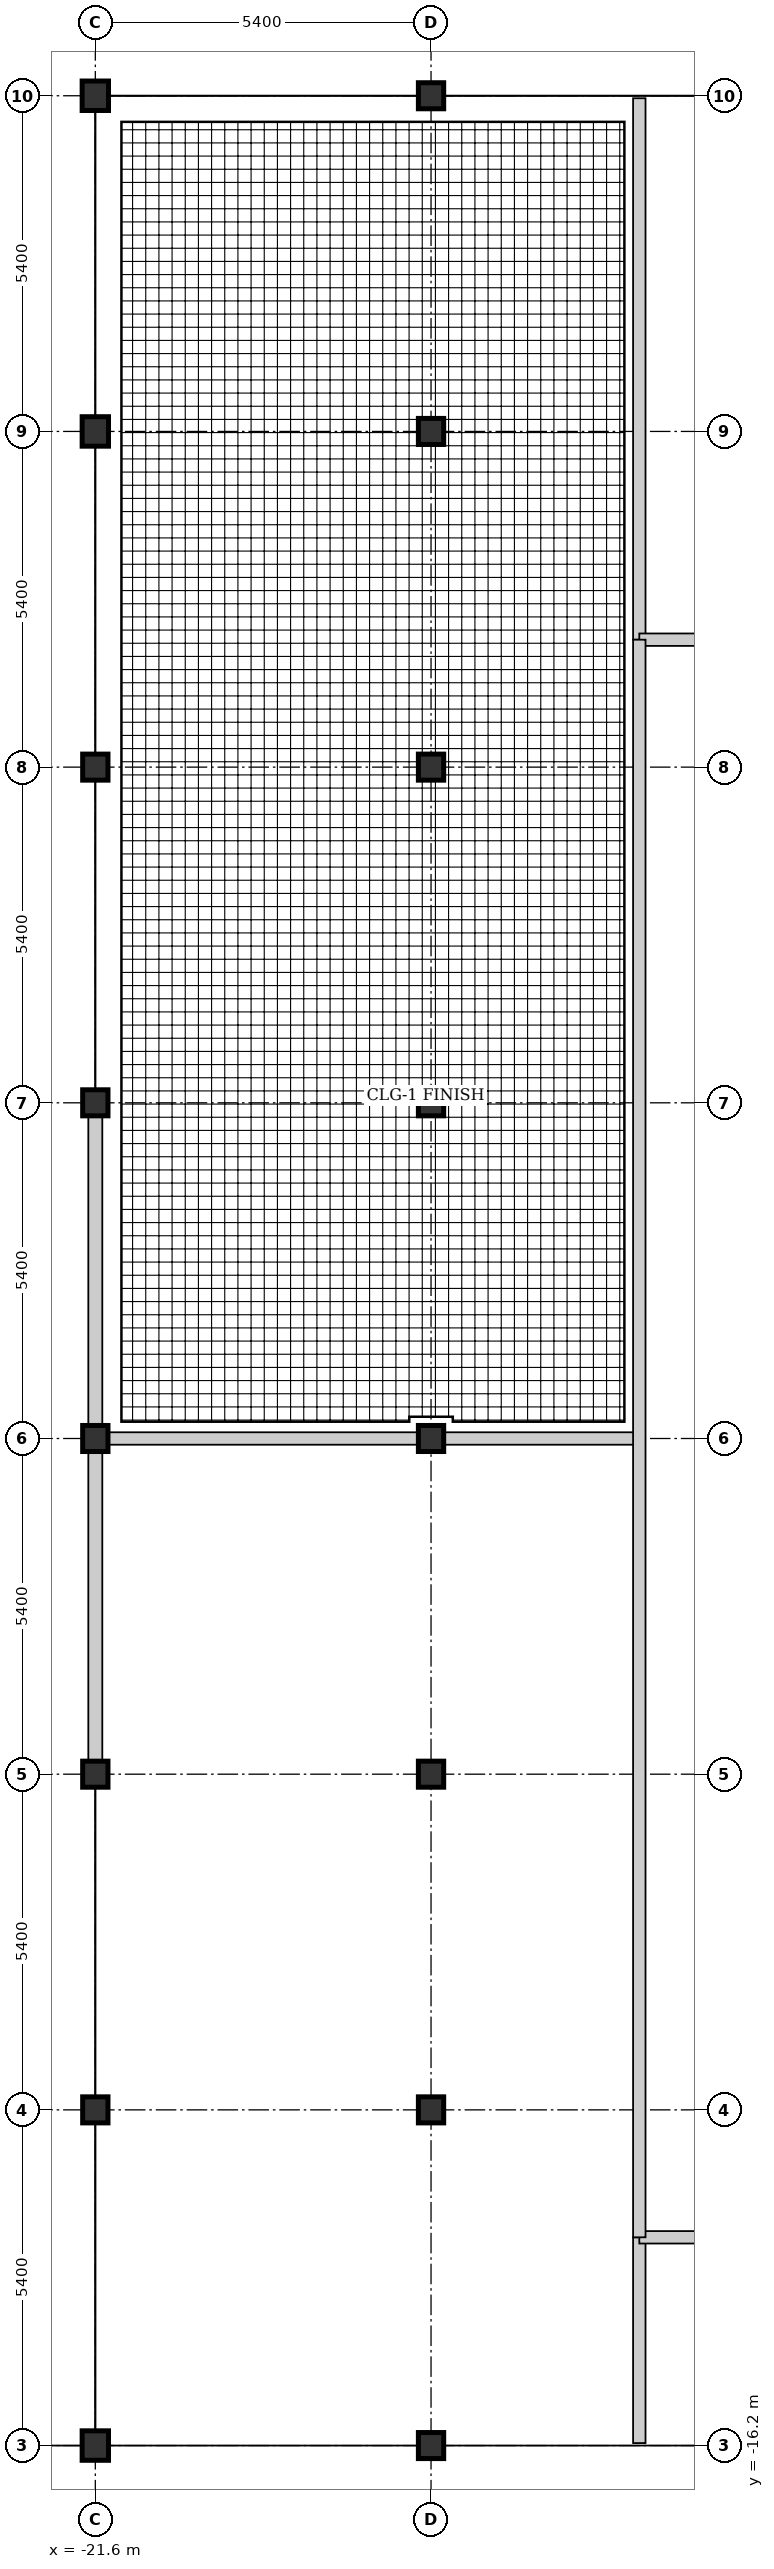
"""IFC4 building model, lengths in metres.
Left out: names, types, materials, properties, quantities, classifications, styles, units other than length and angle.
Written with IfcOpenShell. Run it as: python <this file> out.ifc"""

import sys

from ifc_helpers import new_model, si_unit, direction, frame, frame_2d, origin, origin_2d, place, context, subcontext, project, spatial, rectangle, i_section, extrude, element, fill, save


model = new_model("IFC4")
c1 = context("Model", 3, precision=1e-05, world=origin(), true_north=direction((0.0, 1.0)))
c2 = subcontext(c1, "Body", "Model", "MODEL_VIEW")
j1 = project(units=[si_unit("LENGTHUNIT", "METRE"), si_unit("PLANEANGLEUNIT", "RADIAN")], contexts=[c1])
p1 = place(None, origin())
s1 = spatial("IfcSite", under=j1, at=p1, CompositionType="ELEMENT")
p2 = place(p1, origin())
s2 = spatial("IfcBuilding", under=s1, at=p2, CompositionType="ELEMENT")
p3 = place(p2, frame((0.0, 0.0, 337.5)))
s3 = spatial("IfcBuildingStorey", under=s2, at=p3, CompositionType="ELEMENT", Elevation=337.5)
p4 = place(p3, frame((-21.6, -16.2, 0.0), z_axis=(0.0, 0.0, 1.0), x_axis=(1.0, 0.0, 0.0)))
e1 = element("IfcColumn", 1, at=p4, inside=s3, PredefinedType="COLUMN", context=c2, shape_type="SweptSolid", body=[
    extrude(i_section(OverallWidth=0.424, OverallDepth=0.474, WebThickness=0.043, FlangeThickness=0.065, at=origin_2d()), origin(), (0.0, 0.0, 1.0), 4.5),
])
for number, where, z_axis, x_axis in (
    (2, (-21.6, -10.8, 0.0), (0.0, 0.0, 1.0), (1.0, 0.0, 0.0)),
    (3, (-21.6, -5.4, 0.0), (0.0, 0.0, 1.0), (1.0, 0.0, 0.0)),
    (4, (-21.6, 0.0, 0.0), (0.0, 0.0, 1.0), (1.0, 0.0, 0.0)),
    (5, (-21.6, 5.4, 0.0), (0.0, 0.0, 1.0), (1.0, 0.0, 0.0)),
    (6, (-21.6, 10.8, 0.0), (0.0, 0.0, 1.0), (1.0, 0.0, 0.0)),
):
    element("IfcColumn", number, at=place(p3, frame(where, z_axis=z_axis, x_axis=x_axis)), inside=s3, PredefinedType="COLUMN", context=c2, shape_type="SweptSolid", body=[
        extrude(i_section(OverallWidth=0.407, OverallDepth=0.419, WebThickness=0.031, FlangeThickness=0.049, at=origin_2d()), origin(), (0.0, 0.0, 1.0), 4.5),
    ])
for number, where, z_axis, x_axis in (
    (7, (-21.6, 16.2, 0.0), (0.0, 0.0, 1.0), (1.0, 0.0, 0.0)),
    (8, (-21.6, 21.6, 0.0), (0.0, 0.0, 1.0), (1.0, 0.0, 0.0)),
):
    element("IfcColumn", number, at=place(p3, frame(where, z_axis=z_axis, x_axis=x_axis)), inside=s3, PredefinedType="COLUMN", context=c2, shape_type="SweptSolid", body=[
        extrude(i_section(OverallWidth=0.424, OverallDepth=0.474, WebThickness=0.043, FlangeThickness=0.065, at=origin_2d()), origin(), (0.0, 0.0, 1.0), 4.5),
    ])
for number, where, z_axis, x_axis in (
    (9, (-16.2, -16.2, 0.0), (0.0, 0.0, 1.0), (1.0, 0.0, 0.0)),
    (10, (-16.2, -10.8, 0.0), (0.0, 0.0, 1.0), (1.0, 0.0, 0.0)),
    (11, (-16.2, -5.4, 0.0), (0.0, 0.0, 1.0), (1.0, 0.0, 0.0)),
    (12, (-16.2, 0.0, 0.0), (0.0, 0.0, 1.0), (1.0, 0.0, 0.0)),
    (13, (-16.2, 5.4, 0.0), (0.0, 0.0, 1.0), (1.0, 0.0, 0.0)),
    (14, (-16.2, 10.8, 0.0), (0.0, 0.0, 1.0), (1.0, 0.0, 0.0)),
    (15, (-16.2, 16.2, 0.0), (0.0, 0.0, 1.0), (1.0, 0.0, 0.0)),
    (16, (-16.2, 21.6, 0.0), (0.0, 0.0, 1.0), (1.0, 0.0, 0.0)),
):
    element("IfcColumn", number, at=place(p3, frame(where, z_axis=z_axis, x_axis=x_axis)), inside=s3, PredefinedType="COLUMN", context=c2, shape_type="SweptSolid", body=[
        extrude(i_section(OverallWidth=0.407, OverallDepth=0.419, WebThickness=0.031, FlangeThickness=0.049, at=origin_2d()), origin(), (0.0, 0.0, 1.0), 4.5),
    ])
p5 = place(p3, frame((-21.6, 0.208, 0.0), z_axis=(0.0, 0.0, 1.0), x_axis=(0.0, 1.0, 0.0)))
e17 = element("IfcWall", 17, at=p5, inside=s3, PredefinedType="STANDARD", context=c2, shape_type="SweptSolid", body=[
    extrude(rectangle(XDim=4.984, YDim=0.225, at=frame_2d((2.492, 0.0))), origin(), (0.0, 0.0, 1.0), 3.507),
])
p6 = place(p5, frame((1.742, 0.0, 0.0)))
e18 = element("IfcOpeningElement", 18, at=p6, cuts=e17, PredefinedType="OPENING", context=c2, shape_type="SweptSolid", body=[
    extrude(rectangle(XDim=1.5, YDim=2.2, at=frame_2d((0.75, 1.1))), frame((0.0, 0.123, 0.0), z_axis=(0.0, -1.0, 0.0), x_axis=(1.0, 0.0, 0.0)), (0.0, 0.0, 1.0), 0.245),
])
p7 = place(p3, frame((-21.6, -5.192, 0.0), z_axis=(0.0, 0.0, 1.0), x_axis=(0.0, 1.0, 0.0)))
e19 = element("IfcWall", 19, at=p7, inside=s3, PredefinedType="STANDARD", context=c2, shape_type="SweptSolid", body=[
    extrude(rectangle(XDim=4.984, YDim=0.225, at=frame_2d((2.492, 0.0))), origin(), (0.0, 0.0, 1.0), 3.507),
])
p8 = place(p7, frame((1.542, 0.0, 0.7)))
e20 = element("IfcOpeningElement", 20, at=p8, cuts=e19, PredefinedType="OPENING", context=c2, shape_type="SweptSolid", body=[
    extrude(rectangle(XDim=1.9, YDim=1.8, at=frame_2d((0.95, 0.9))), frame((0.0, 0.123, 0.0), z_axis=(0.0, -1.0, 0.0), x_axis=(1.0, 0.0, 0.0)), (0.0, 0.0, 1.0), 0.245),
])
p9 = place(p3, frame((-12.85, 12.85, 0.0), z_axis=(0.0, 0.0, 1.0), x_axis=(0.0, 1.0, 0.0)))
e21 = element("IfcWall", 21, at=p9, inside=s3, PredefinedType="PARTITIONING", context=c2, shape_type="SweptSolid", body=[
    extrude(rectangle(XDim=8.71, YDim=0.2, at=frame_2d((4.355, 0.0))), origin(), (0.0, 0.0, 1.0), 3.507),
])
p10 = place(p3, frame((-12.85, -16.16, 0.0), z_axis=(0.0, 0.0, 1.0), x_axis=(0.0, 1.0, 0.0)))
e22 = element("IfcWall", 22, at=p10, inside=s3, PredefinedType="PARTITIONING", context=c2, shape_type="SweptSolid", body=[
    extrude(rectangle(XDim=3.31, YDim=0.2, at=frame_2d((1.655, 0.0))), origin(), (0.0, 0.0, 1.0), 3.507),
])
p11 = place(p3, frame((-21.56, 0.0, 0.0), z_axis=(0.0, 0.0, 1.0), x_axis=(1.0, 0.0, 0.0)))
e23 = element("IfcWall", 23, at=p11, inside=s3, PredefinedType="PARTITIONING", context=c2, shape_type="SweptSolid", body=[
    extrude(rectangle(XDim=8.71, YDim=0.2, at=frame_2d((4.355, 0.0))), origin(), (0.0, 0.0, 1.0), 3.507),
])
p12 = place(p3, frame((-12.85, 12.85, 0.0), z_axis=(0.0, 0.0, 1.0), x_axis=(1.0, 0.0, 0.0)))
e24 = element("IfcWall", 24, at=p12, inside=s3, PredefinedType="PARTITIONING", context=c2, shape_type="SweptSolid", body=[
    extrude(rectangle(XDim=23.61, YDim=0.2, at=frame_2d((11.805, 0.0))), origin(), (0.0, 0.0, 1.0), 3.507),
])
p13 = place(p12, frame((9.5, 0.0, 0.0)))
e25 = element("IfcOpeningElement", 25, at=p13, cuts=e24, PredefinedType="OPENING", context=c2, shape_type="SweptSolid", body=[
    extrude(rectangle(XDim=1.1, YDim=2.1, at=frame_2d((0.55, 1.05))), frame((0.0, 0.11, 0.0), z_axis=(0.0, -1.0, 0.0), x_axis=(1.0, 0.0, 0.0)), (0.0, 0.0, 1.0), 0.22),
])
p14 = place(p3, frame((-12.85, -12.85, 0.0), z_axis=(0.0, 0.0, 1.0), x_axis=(1.0, 0.0, 0.0)))
e26 = element("IfcWall", 26, at=p14, inside=s3, PredefinedType="PARTITIONING", context=c2, shape_type="SweptSolid", body=[
    extrude(rectangle(XDim=24.05, YDim=0.2, at=frame_2d((12.025, 0.0))), origin(), (0.0, 0.0, 1.0), 3.507),
])
p15 = place(p14, frame((9.5, 0.0, 0.0)))
e27 = element("IfcOpeningElement", 27, at=p15, cuts=e26, PredefinedType="OPENING", context=c2, shape_type="SweptSolid", body=[
    extrude(rectangle(XDim=1.1, YDim=2.1, at=frame_2d((0.55, 1.05))), frame((0.0, 0.11, 0.0), z_axis=(0.0, -1.0, 0.0), x_axis=(1.0, 0.0, 0.0)), (0.0, 0.0, 1.0), 0.22),
])
p16 = place(p3, frame((-12.85, -12.85, 0.0), z_axis=(0.0, 0.0, 1.0), x_axis=(0.0, 1.0, 0.0)))
e28 = element("IfcWall", 28, at=p16, inside=s3, PredefinedType="PARTITIONING", context=c2, shape_type="SweptSolid", body=[
    extrude(rectangle(XDim=25.7, YDim=0.2, at=frame_2d((12.85, 0.0))), origin(), (0.0, 0.0, 1.0), 3.663),
])
p17 = place(p16, frame((16.5, 0.0, 0.0)))
e29 = element("IfcOpeningElement", 29, at=p17, cuts=e28, PredefinedType="OPENING", context=c2, shape_type="SweptSolid", body=[
    extrude(rectangle(XDim=1.1, YDim=2.1, at=frame_2d((0.55, 1.05))), frame((0.0, 0.11, 0.0), z_axis=(0.0, -1.0, 0.0), x_axis=(1.0, 0.0, 0.0)), (0.0, 0.0, 1.0), 0.22),
])
p18 = place(p16, frame((3.2, 0.0, 0.0)))
e30 = element("IfcOpeningElement", 30, at=p18, cuts=e28, PredefinedType="OPENING", context=c2, shape_type="SweptSolid", body=[
    extrude(rectangle(XDim=1.1, YDim=2.1, at=frame_2d((0.55, 1.05))), frame((0.0, 0.11, 0.0), z_axis=(0.0, -1.0, 0.0), x_axis=(1.0, 0.0, 0.0)), (0.0, 0.0, 1.0), 0.22),
])
p19 = place(p6, origin())
e31 = element("IfcDoor", 31, at=p19, inside=s3, OperationType="DOUBLE_DOOR_SINGLE_SWING", PredefinedType="DOOR", context=c2, shape_type="SweptSolid", body=[
    extrude(rectangle(XDim=1.5, YDim=2.2, at=frame_2d((0.75, 1.1))), frame((0.0, 0.025, 0.0), z_axis=(0.0, -1.0, 0.0), x_axis=(1.0, 0.0, 0.0)), (0.0, 0.0, 1.0), 0.05),
])
fill(e18, e31)
p20 = place(p8, origin())
e32 = element("IfcWindow", 32, at=p20, inside=s3, PartitioningType="SINGLE_PANEL", PredefinedType="WINDOW", context=c2, shape_type="SweptSolid", body=[
    extrude(rectangle(XDim=1.9, YDim=1.8, at=frame_2d((0.95, 0.9))), frame((0.0, 0.03, 0.0), z_axis=(0.0, -1.0, 0.0), x_axis=(1.0, 0.0, 0.0)), (0.0, 0.0, 1.0), 0.06),
])
fill(e20, e32)
p21 = place(p17, origin())
e33 = element("IfcDoor", 33, at=p21, inside=s3, OperationType="SINGLE_SWING_RIGHT", PredefinedType="DOOR", context=c2, shape_type="SweptSolid", body=[
    extrude(rectangle(XDim=1.1, YDim=2.1, at=frame_2d((0.55, 1.05))), frame((0.0, 0.025, 0.0), z_axis=(0.0, -1.0, 0.0), x_axis=(1.0, 0.0, 0.0)), (0.0, 0.0, 1.0), 0.05),
])
fill(e29, e33)
p22 = place(p18, origin())
e34 = element("IfcDoor", 34, at=p22, inside=s3, OperationType="SINGLE_SWING_LEFT", PredefinedType="DOOR", context=c2, shape_type="SweptSolid", body=[
    extrude(rectangle(XDim=1.1, YDim=2.1, at=frame_2d((0.55, 1.05))), frame((0.0, 0.025, 0.0), z_axis=(0.0, -1.0, 0.0), x_axis=(1.0, 0.0, 0.0)), (0.0, 0.0, 1.0), 0.05),
])
fill(e30, e34)
save(model, sys.argv[1])
